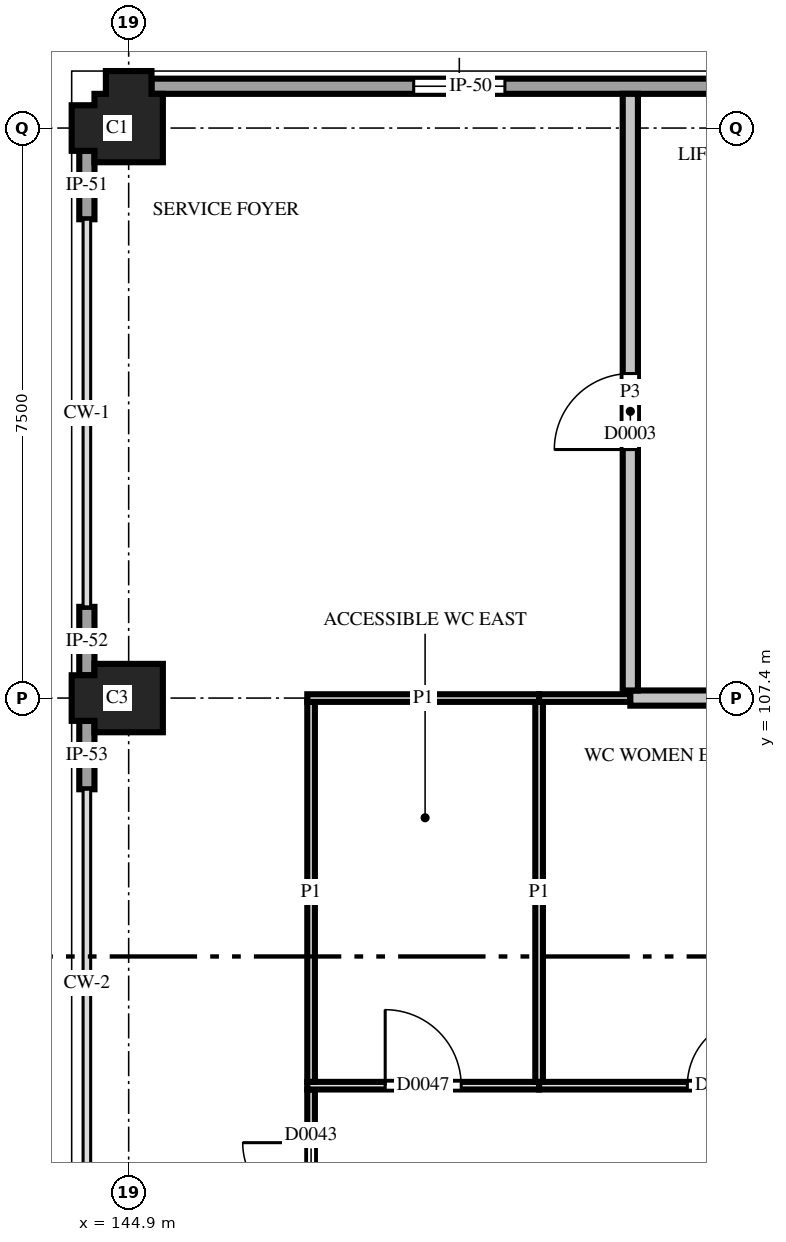
"""IFC4 building model, lengths in metres.
Left out: names, types, materials, properties, quantities, classifications, styles, units other than length and angle.
Written with IfcOpenShell. Run it as: python <this file> out.ifc"""

import sys

from ifc_helpers import new_model, si_unit, direction, frame, frame_2d, origin, place, context, subcontext, project, spatial, polyline, rectangle, outline, extrude, element, fill, save


model = new_model("IFC4")
c1 = context("Model", 3, precision=1e-05, world=origin(), true_north=direction((0.0, 1.0)))
c2 = subcontext(c1, "Body", "Model", "MODEL_VIEW")
j1 = project(units=[si_unit("LENGTHUNIT", "METRE"), si_unit("PLANEANGLEUNIT", "RADIAN")], contexts=[c1])
p1 = place(None, origin())
s1 = spatial("IfcSite", under=j1, at=p1, CompositionType="ELEMENT")
p2 = place(p1, origin())
s2 = spatial("IfcBuilding", under=s1, at=p2, CompositionType="ELEMENT")
p3 = place(p2, origin())
s3 = spatial("IfcBuildingStorey", under=s2, at=p3, CompositionType="ELEMENT", Elevation=0.0)
p4 = place(p3, frame((144.9, 107.4, 0.0), z_axis=(0.0, 0.0, 1.0), x_axis=(-1.0, 0.0, 0.0)))
e1 = element("IfcColumn", 1, at=p4, inside=s3, PredefinedType="COLUMN", context=c2, shape_type="SweptSolid", body=[
    extrude(outline(polyline([(-0.45, -0.45), (0.45, -0.45), (0.45, -0.3), (0.75, -0.3), (0.75, 0.3), (0.45, 0.3), (0.45, 0.45), (-0.45, 0.45), (-0.45, -0.45)])), origin(), (0.0, 0.0, 1.0), 4.5),
])
p5 = place(p3, frame((144.9, 114.9, 0.0), z_axis=(0.0, 0.0, 1.0), x_axis=(0.0, 1.0, 0.0)))
e2 = element("IfcColumn", 2, at=p5, inside=s3, PredefinedType="COLUMN", context=c2, shape_type="SweptSolid", body=[
    extrude(outline(polyline([(-0.45, -0.45), (0.45, -0.45), (0.45, -0.3), (0.75, -0.3), (0.75, 0.3), (0.45, 0.3), (0.45, 0.45), (0.3, 0.45), (0.3, 0.75), (-0.3, 0.75), (-0.3, 0.45), (-0.45, 0.45), (-0.45, -0.45)])), origin(), (0.0, 0.0, 1.0), 4.5),
])
p6 = place(p3, frame((153.6, 115.45, 0.0), z_axis=(0.0, 0.0, 1.0), x_axis=(-1.0, 0.0, 0.0)))
e3 = element("IfcWall", 3, at=p6, inside=s3, PredefinedType="SOLIDWALL", context=c2, shape_type="SweptSolid", body=[
    extrude(outline(polyline([(0.0, 0.0), (8.4, 0.0), (8.4, 2.5), (7.502, 2.5), (7.5, 2.4), (7.106, 2.412), (6.712, 2.422), (6.319, 2.43), (5.925, 2.438), (5.531, 2.443), (5.137, 2.447), (4.744, 2.449), (4.35, 2.45), (3.956, 2.449), (3.562, 2.447), (3.169, 2.443), (2.775, 2.438), (2.381, 2.43), (1.988, 2.422), (1.594, 2.412), (1.2, 2.4), (1.198, 2.5), (0.0, 2.5), (0.0, 0.0)])), frame((0.0, 0.1, 0.0), z_axis=(0.0, -1.0, 0.0), x_axis=(1.0, 0.0, 0.0)), (0.0, 0.0, 1.0), 0.2),
])
p7 = place(p6, frame((3.75, 0.0, 0.6)))
e4 = element("IfcOpeningElement", 4, at=p7, cuts=e3, PredefinedType="OPENING", context=c2, shape_type="SweptSolid", body=[
    extrude(rectangle(XDim=1.2, YDim=1.2, at=frame_2d((0.6, 0.6))), frame((0.0, 0.11, 0.0), z_axis=(0.0, -1.0, 0.0), x_axis=(1.0, 0.0, 0.0)), (0.0, 0.0, 1.0), 0.22),
])
for number, where, z_axis, x_axis in (
    (5, (144.35, 114.6, 0.0), (0.0, 0.0, 1.0), (0.0, -1.0, 0.0)),
    (6, (144.35, 108.6, 0.0), (0.0, 0.0, 1.0), (0.0, -1.0, 0.0)),
    (7, (144.35, 107.1, 0.0), (0.0, 0.0, 1.0), (0.0, -1.0, 0.0)),
):
    element("IfcWall", number, at=place(p3, frame(where, z_axis=z_axis, x_axis=x_axis)), inside=s3, PredefinedType="SOLIDWALL", context=c2, shape_type="SweptSolid", body=[
        extrude(rectangle(XDim=0.9, YDim=0.2, at=frame_2d((0.45, 0.0))), origin(), (0.0, 0.0, 1.0), 3.1),
    ])
p8 = place(p3, frame((147.3, 102.25, 0.0), z_axis=(0.0, 0.0, 1.0), x_axis=(0.0, -1.0, 0.0)))
e8 = element("IfcWall", 8, at=p8, inside=s3, PredefinedType="PARTITIONING", context=c2, shape_type="SweptSolid", body=[
    extrude(rectangle(XDim=2.3, YDim=0.1, at=frame_2d((1.15, 0.0))), origin(), (0.0, 0.0, 1.0), 3.68),
])
p9 = place(p8, frame((0.7, 0.0, 0.0)))
e9 = element("IfcOpeningElement", 9, at=p9, cuts=e8, PredefinedType="OPENING", context=c2, shape_type="SweptSolid", body=[
    extrude(rectangle(XDim=0.9, YDim=2.1, at=frame_2d((0.45, 1.05))), frame((0.0, 0.06, 0.0), z_axis=(0.0, -1.0, 0.0), x_axis=(1.0, 0.0, 0.0)), (0.0, 0.0, 1.0), 0.12),
])
p10 = place(p3, frame((150.3, 102.3, 0.0), z_axis=(0.0, 0.0, 1.0), x_axis=(-1.0, 0.0, 0.0)))
e10 = element("IfcWall", 10, at=p10, inside=s3, PredefinedType="PARTITIONING", context=c2, shape_type="SweptSolid", body=[
    extrude(rectangle(XDim=3.05, YDim=0.1, at=frame_2d((1.525, 0.0))), origin(), (0.0, 0.0, 1.0), 3.68),
])
p11 = place(p10, frame((1.025, 0.0, 0.0)))
e11 = element("IfcOpeningElement", 11, at=p11, cuts=e10, PredefinedType="OPENING", context=c2, shape_type="SweptSolid", body=[
    extrude(rectangle(XDim=1.0, YDim=2.1, at=frame_2d((0.5, 1.05))), frame((0.0, 0.06, 0.0), z_axis=(0.0, -1.0, 0.0), x_axis=(1.0, 0.0, 0.0)), (0.0, 0.0, 1.0), 0.12),
])
p12 = place(p3, frame((155.1, 102.3, 0.0), z_axis=(0.0, 0.0, 1.0), x_axis=(-1.0, 0.0, 0.0)))
e12 = element("IfcWall", 12, at=p12, inside=s3, PredefinedType="PARTITIONING", context=c2, shape_type="SweptSolid", body=[
    extrude(rectangle(XDim=4.8, YDim=0.1, at=frame_2d((2.4, 0.0))), origin(), (0.0, 0.0, 1.0), 3.68),
])
p13 = place(p12, frame((1.95, 0.0, 0.0)))
e13 = element("IfcOpeningElement", 13, at=p13, cuts=e12, PredefinedType="OPENING", context=c2, shape_type="SweptSolid", body=[
    extrude(rectangle(XDim=0.9, YDim=2.1, at=frame_2d((0.45, 1.05))), frame((0.0, 0.06, 0.0), z_axis=(0.0, -1.0, 0.0), x_axis=(1.0, 0.0, 0.0)), (0.0, 0.0, 1.0), 0.12),
])
for number, where, z_axis, x_axis in (
    (14, (147.3, 107.35, 0.0), (0.0, 0.0, 1.0), (0.0, -1.0, 0.0)),
    (15, (150.3, 107.35, 0.0), (0.0, 0.0, 1.0), (0.0, -1.0, 0.0)),
):
    element("IfcWall", number, at=place(p3, frame(where, z_axis=z_axis, x_axis=x_axis)), inside=s3, PredefinedType="PARTITIONING", context=c2, shape_type="SweptSolid", body=[
        extrude(rectangle(XDim=5.0, YDim=0.1, at=frame_2d((2.5, 0.0))), origin(), (0.0, 0.0, 1.0), 3.68),
    ])
p14 = place(p3, frame((150.3, 107.4, 0.0), z_axis=(0.0, 0.0, 1.0), x_axis=(-1.0, 0.0, 0.0)))
e16 = element("IfcWall", 16, at=p14, inside=s3, PredefinedType="PARTITIONING", context=c2, shape_type="SweptSolid", body=[
    extrude(rectangle(XDim=3.05, YDim=0.1, at=frame_2d((1.525, 0.0))), origin(), (0.0, 0.0, 1.0), 3.68),
])
p15 = place(p3, frame((151.5, 107.4, 0.0), z_axis=(0.0, 0.0, 1.0), x_axis=(-1.0, 0.0, 0.0)))
e17 = element("IfcWall", 17, at=p15, inside=s3, PredefinedType="PARTITIONING", context=c2, shape_type="SweptSolid", body=[
    extrude(rectangle(XDim=1.2, YDim=0.1, at=frame_2d((0.6, 0.0))), origin(), (0.0, 0.0, 1.0), 3.68),
])
p16 = place(p3, frame((151.5, 107.4, 0.0), z_axis=(0.0, 0.0, 1.0), x_axis=(1.0, 0.0, 0.0)))
e18 = element("IfcWall", 18, at=p16, inside=s3, PredefinedType="PARTITIONING", context=c2, shape_type="SweptSolid", body=[
    extrude(rectangle(XDim=3.6, YDim=0.2, at=frame_2d((1.8, 0.0))), origin(), (0.0, 0.0, 1.0), 3.68),
])
p17 = place(p3, frame((151.5, 115.35, 0.0), z_axis=(0.0, 0.0, 1.0), x_axis=(0.0, -1.0, 0.0)))
e19 = element("IfcWall", 19, at=p17, inside=s3, PredefinedType="PARTITIONING", context=c2, shape_type="SweptSolid", body=[
    extrude(rectangle(XDim=7.85, YDim=0.2, at=frame_2d((3.925, 0.0))), origin(), (0.0, 0.0, 1.0), 3.68),
])
p18 = place(p17, frame((3.68, 0.0, 0.0)))
e20 = element("IfcOpeningElement", 20, at=p18, cuts=e19, PredefinedType="OPENING", context=c2, shape_type="SweptSolid", body=[
    extrude(rectangle(XDim=1.0, YDim=2.1, at=frame_2d((0.5, 1.05))), frame((0.0, 0.11, 0.0), z_axis=(0.0, -1.0, 0.0), x_axis=(1.0, 0.0, 0.0)), (0.0, 0.0, 1.0), 0.22),
])
p19 = place(p7, origin())
e21 = element("IfcWindow", 21, at=p19, inside=s3, PartitioningType="SINGLE_PANEL", PredefinedType="WINDOW", context=c2, shape_type="SweptSolid", body=[
    extrude(rectangle(XDim=1.2, YDim=1.2, at=frame_2d((0.6, 0.6))), frame((0.0, 0.03, 0.0), z_axis=(0.0, -1.0, 0.0), x_axis=(1.0, 0.0, 0.0)), (0.0, 0.0, 1.0), 0.06),
])
fill(e4, e21)
p20 = place(p18, origin())
e22 = element("IfcDoor", 22, at=p20, inside=s3, OperationType="SINGLE_SWING_RIGHT", PredefinedType="DOOR", context=c2, shape_type="SweptSolid", body=[
    extrude(rectangle(XDim=1.0, YDim=2.1, at=frame_2d((0.5, 1.05))), frame((0.0, 0.025, 0.0), z_axis=(0.0, -1.0, 0.0), x_axis=(1.0, 0.0, 0.0)), (0.0, 0.0, 1.0), 0.05),
])
fill(e20, e22)
p21 = place(p9, origin())
e23 = element("IfcDoor", 23, at=p21, inside=s3, OperationType="SINGLE_SWING_LEFT", PredefinedType="DOOR", context=c2, shape_type="SweptSolid", body=[
    extrude(rectangle(XDim=0.9, YDim=2.1, at=frame_2d((0.45, 1.05))), frame((0.0, 0.025, 0.0), z_axis=(0.0, -1.0, 0.0), x_axis=(1.0, 0.0, 0.0)), (0.0, 0.0, 1.0), 0.05),
])
fill(e9, e23)
p22 = place(p13, origin())
e24 = element("IfcDoor", 24, at=p22, inside=s3, OperationType="SINGLE_SWING_LEFT", PredefinedType="DOOR", context=c2, shape_type="SweptSolid", body=[
    extrude(rectangle(XDim=0.9, YDim=2.1, at=frame_2d((0.45, 1.05))), frame((0.0, 0.025, 0.0), z_axis=(0.0, -1.0, 0.0), x_axis=(1.0, 0.0, 0.0)), (0.0, 0.0, 1.0), 0.05),
])
fill(e13, e24)
p23 = place(p11, origin())
e25 = element("IfcDoor", 25, at=p23, inside=s3, OperationType="SINGLE_SWING_RIGHT", PredefinedType="DOOR", context=c2, shape_type="SweptSolid", body=[
    extrude(rectangle(XDim=1.0, YDim=2.1, at=frame_2d((0.5, 1.05))), frame((0.0, 0.025, 0.0), z_axis=(0.0, -1.0, 0.0), x_axis=(1.0, 0.0, 0.0)), (0.0, 0.0, 1.0), 0.05),
])
fill(e11, e25)
save(model, sys.argv[1])
